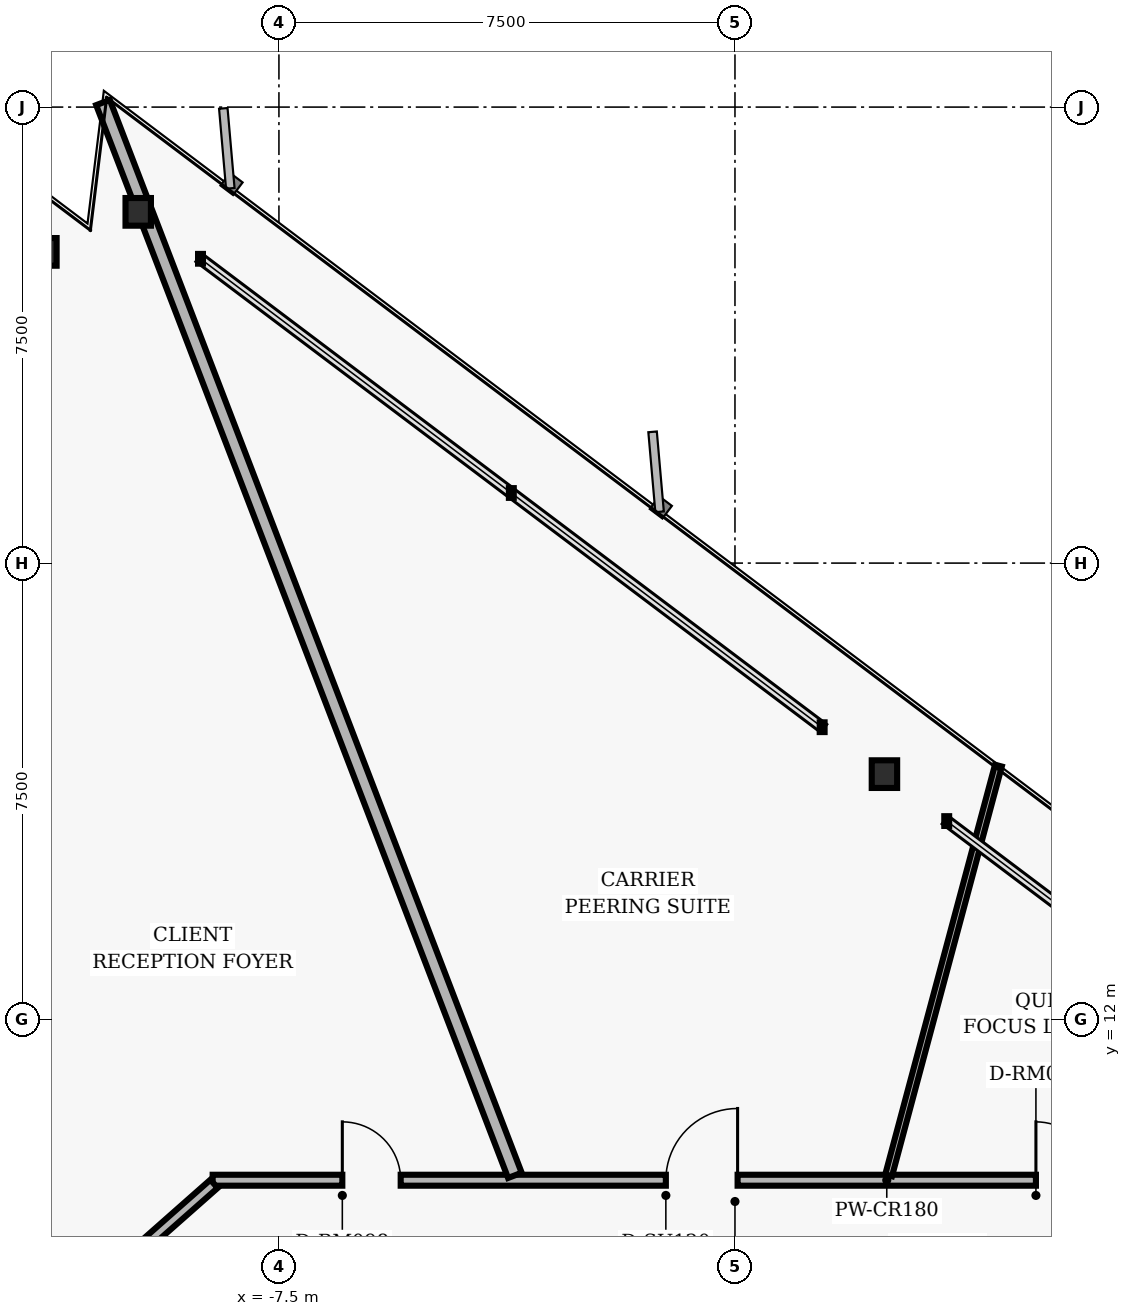
"""IFC4 building model, lengths in metres.
Left out: names, types, materials, properties, quantities, classifications, styles, units other than length and angle.
Written with IfcOpenShell. Run it as: python <this file> out.ifc"""

import sys

from ifc_helpers import new_model, si_unit, direction, frame, frame_2d, origin, origin_2d, place, context, subcontext, project, spatial, rectangle, i_section, extrude, element, fill, save


model = new_model("IFC4")
c1 = context("Model", 3, precision=1e-05, world=origin(), true_north=direction((0.0, 1.0)))
c2 = subcontext(c1, "Body", "Model", "MODEL_VIEW")
j1 = project(units=[si_unit("LENGTHUNIT", "METRE"), si_unit("PLANEANGLEUNIT", "RADIAN")], contexts=[c1])
p1 = place(None, origin())
s1 = spatial("IfcSite", under=j1, at=p1, CompositionType="ELEMENT")
p2 = place(p1, origin())
s2 = spatial("IfcBuilding", under=s1, at=p2, CompositionType="ELEMENT")
p3 = place(p2, frame((0.0, 0.0, 63.04)))
s3 = spatial("IfcBuildingStorey", under=s2, at=p3, CompositionType="ELEMENT", Elevation=63.04)
for number, where, z_axis, x_axis in (
    (1, (2.458, 16.029, 0.0), (0.0, 0.0, 1.0), (1.0, 0.0, 0.0)),
    (2, (-9.814, 25.277, 0.0), (0.0, 0.0, 1.0), (1.0, 0.0, 0.0)),
    (3, (-11.365, 24.619, 0.0), (0.0, 0.0, 1.0), (1.0, 0.0, 0.0)),
):
    element("IfcColumn", number, at=place(p3, frame(where, z_axis=z_axis, x_axis=x_axis)), inside=s3, PredefinedType="COLUMN", context=c2, shape_type="SweptSolid", body=[
        extrude(i_section(OverallWidth=0.418, OverallDepth=0.455, WebThickness=0.042, FlangeThickness=0.068, FilletRadius=0.025, at=origin_2d()), origin(), (0.0, 0.0, 1.0), 3.36),
    ])
p4 = place(p3, frame((-8.59, 9.35, 0.0), z_axis=(0.0, 0.0, 1.0), x_axis=(1.0, 0.0, 0.0)))
e4 = element("IfcWall", 4, at=p4, inside=s3, PredefinedType="PARTITIONING", context=c2, shape_type="SweptSolid", body=[
    extrude(rectangle(XDim=17.18, YDim=0.18, at=frame_2d((8.59, 0.0))), origin(), (0.0, 0.0, 1.0), 3.073),
])
p5 = place(p4, frame((13.54, 0.0, 0.0)))
e5 = element("IfcOpeningElement", 5, at=p5, cuts=e4, PredefinedType="OPENING", context=c2, shape_type="SweptSolid", body=[
    extrude(rectangle(XDim=0.96, YDim=2.02, at=frame_2d((0.48, 1.01))), frame((0.0, 0.1, 0.0), z_axis=(0.0, -1.0, 0.0), x_axis=(1.0, 0.0, 0.0)), (0.0, 0.0, 1.0), 0.2),
])
p6 = place(p4, frame((7.453, 0.0, 0.0)))
e6 = element("IfcOpeningElement", 6, at=p6, cuts=e4, PredefinedType="OPENING", context=c2, shape_type="SweptSolid", body=[
    extrude(rectangle(XDim=1.18, YDim=2.02, at=frame_2d((0.59, 1.01))), frame((0.0, 0.1, 0.0), z_axis=(0.0, -1.0, 0.0), x_axis=(1.0, 0.0, 0.0)), (0.0, 0.0, 1.0), 0.2),
])
p7 = place(p4, frame((2.133, 0.0, 0.0)))
e7 = element("IfcOpeningElement", 7, at=p7, cuts=e4, PredefinedType="OPENING", context=c2, shape_type="SweptSolid", body=[
    extrude(rectangle(XDim=0.96, YDim=2.02, at=frame_2d((0.48, 1.01))), frame((0.0, 0.1, 0.0), z_axis=(0.0, -1.0, 0.0), x_axis=(1.0, 0.0, 0.0)), (0.0, 0.0, 1.0), 0.2),
])
p8 = place(p3, frame((-13.268, 5.14, 0.0), z_axis=(0.0, 0.0, 1.0), x_axis=(0.749626463267, 0.66186113768, 0.0)))
e8 = element("IfcWall", 8, at=p8, inside=s3, PredefinedType="PARTITIONING", context=c2, shape_type="SweptSolid", body=[
    extrude(rectangle(XDim=6.27, YDim=0.18, at=frame_2d((3.135, 0.0))), origin(), (0.0, 0.0, 1.0), 3.073),
])
p9 = place(p3, frame((2.527, 9.43, 0.0), z_axis=(0.0, 0.0, 1.0), x_axis=(0.258803716415, 0.965929933468, 0.0)))
e9 = element("IfcWall", 9, at=p9, inside=s3, PredefinedType="MOVABLE", context=c2, shape_type="SweptSolid", body=[
    extrude(rectangle(XDim=6.977, YDim=0.115, at=frame_2d((3.489, 0.0))), origin(), (0.0, 0.0, 1.0), 3.073),
])
p10 = place(p3, frame((-3.62, 9.43, 0.0), z_axis=(0.0, 0.0, 1.0), x_axis=(-0.358366182081, 0.933581104961, 0.0)))
e10 = element("IfcWall", 10, at=p10, inside=s3, PredefinedType="PARTITIONING", context=c2, shape_type="SweptSolid", body=[
    extrude(rectangle(XDim=18.901, YDim=0.24, at=frame_2d((9.45, 0.0))), origin(), (0.0, 0.0, 1.0), 3.073),
])
p11 = place(p3, frame((-11.069, 7.188, 0.0), z_axis=(0.0, 0.0, 1.0), x_axis=(-0.838653238926, 0.544665718436, 0.0)))
e11 = element("IfcWall", 11, at=p11, inside=s3, PredefinedType="PARTITIONING", context=c2, shape_type="SweptSolid", body=[
    extrude(rectangle(XDim=4.07, YDim=0.16, at=frame_2d((2.035, 0.0))), origin(), (0.0, 0.0, 1.0), 2.358),
])
p12 = place(p5, origin())
e12 = element("IfcDoor", 12, at=p12, inside=s3, OperationType="SINGLE_SWING_LEFT", PredefinedType="DOOR", context=c2, shape_type="SweptSolid", body=[
    extrude(rectangle(XDim=0.96, YDim=2.02, at=frame_2d((0.48, 1.01))), frame((0.0, 0.025, 0.0), z_axis=(0.0, -1.0, 0.0), x_axis=(1.0, 0.0, 0.0)), (0.0, 0.0, 1.0), 0.05),
])
fill(e5, e12)
p13 = place(p6, origin())
e13 = element("IfcDoor", 13, at=p13, inside=s3, OperationType="SINGLE_SWING_RIGHT", PredefinedType="DOOR", context=c2, shape_type="SweptSolid", body=[
    extrude(rectangle(XDim=1.18, YDim=2.02, at=frame_2d((0.59, 1.01))), frame((0.0, 0.025, 0.0), z_axis=(0.0, -1.0, 0.0), x_axis=(1.0, 0.0, 0.0)), (0.0, 0.0, 1.0), 0.05),
])
fill(e6, e13)
p14 = place(p7, origin())
e14 = element("IfcDoor", 14, at=p14, inside=s3, OperationType="SINGLE_SWING_LEFT", PredefinedType="DOOR", context=c2, shape_type="SweptSolid", body=[
    extrude(rectangle(XDim=0.96, YDim=2.02, at=frame_2d((0.48, 1.01))), frame((0.0, 0.025, 0.0), z_axis=(0.0, -1.0, 0.0), x_axis=(1.0, 0.0, 0.0)), (0.0, 0.0, 1.0), 0.05),
])
fill(e7, e14)
save(model, sys.argv[1])
